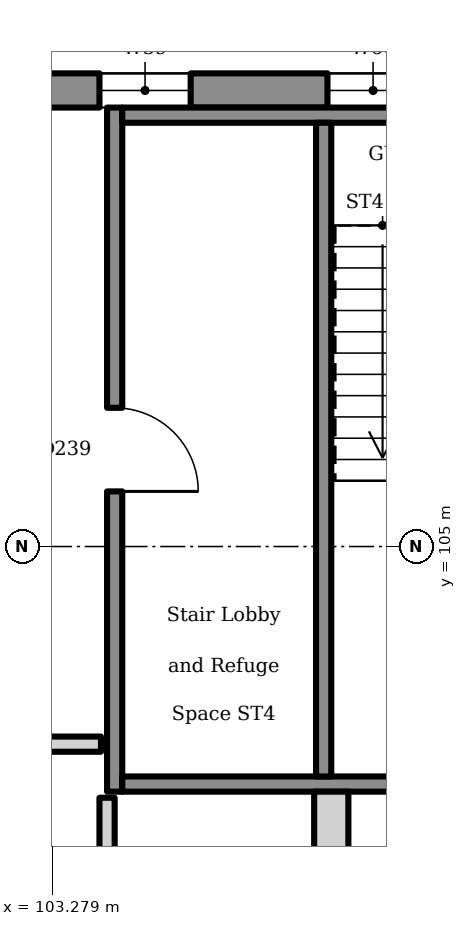
"""IFC4 building model, lengths in metres.
Left out: names, types, materials, properties, quantities, classifications, styles, units other than length and angle.
Written with IfcOpenShell. Run it as: python <this file> out.ifc"""

import sys

from ifc_helpers import new_model, si_unit, direction, frame, frame_2d, origin, place, context, subcontext, project, spatial, rectangle, extrude, element, fill, save


model = new_model("IFC4")
c1 = context("Model", 3, precision=1e-05, world=origin(), true_north=direction((0.0, 1.0)))
c2 = subcontext(c1, "Body", "Model", "MODEL_VIEW")
j1 = project(units=[si_unit("LENGTHUNIT", "METRE"), si_unit("PLANEANGLEUNIT", "RADIAN")], contexts=[c1])
p1 = place(None, origin())
s1 = spatial("IfcSite", under=j1, at=p1, CompositionType="ELEMENT")
p2 = place(p1, origin())
s2 = spatial("IfcBuilding", under=s1, at=p2, CompositionType="ELEMENT")
p3 = place(p2, frame((0.0, 0.0, 5.4)))
s3 = spatial("IfcBuildingStorey", under=s2, at=p3, CompositionType="ELEMENT", Elevation=5.4)
p4 = place(p3, frame((101.825, 111.0, 0.0), z_axis=(0.0, 0.0, 1.0), x_axis=(1.0, 0.0, 0.0)))
e1 = element("IfcWall", 1, at=p4, inside=s3, PredefinedType="SOLIDWALL", context=c2, shape_type="SweptSolid", body=[
    extrude(rectangle(XDim=8.35, YDim=0.45, at=frame_2d((4.175, 0.0))), origin(), (0.0, 0.0, 1.0), 3.8),
])
p5 = place(p4, frame((2.075, 0.0, 0.8)))
e2 = element("IfcOpeningElement", 2, at=p5, cuts=e1, PredefinedType="OPENING", context=c2, shape_type="SweptSolid", body=[
    extrude(rectangle(XDim=1.2, YDim=1.4, at=frame_2d((0.6, 0.7))), frame((0.0, 0.235, 0.0), z_axis=(0.0, -1.0, 0.0), x_axis=(1.0, 0.0, 0.0)), (0.0, 0.0, 1.0), 0.47),
])
p6 = place(p4, frame((5.075, 0.0, 0.8)))
e3 = element("IfcOpeningElement", 3, at=p6, cuts=e1, PredefinedType="OPENING", context=c2, shape_type="SweptSolid", body=[
    extrude(rectangle(XDim=1.2, YDim=1.4, at=frame_2d((0.6, 0.7))), frame((0.0, 0.235, 0.0), z_axis=(0.0, -1.0, 0.0), x_axis=(1.0, 0.0, 0.0)), (0.0, 0.0, 1.0), 0.47),
])
p7 = place(p3, frame((106.95, 99.891, 0.0), z_axis=(0.0, 0.0, 1.0), x_axis=(0.0, 1.0, 0.0)))
e4 = element("IfcWall", 4, at=p7, inside=s3, PredefinedType="SOLIDWALL", context=c2, shape_type="SweptSolid", body=[
    extrude(rectangle(XDim=1.884, YDim=0.45, at=frame_2d((0.942, 0.0))), origin(), (0.0, 0.0, 1.0), 4.3),
])
p8 = place(p3, frame((104.1, 101.775, 0.0), z_axis=(0.0, 0.0, 1.0), x_axis=(0.0, 1.0, 0.0)))
e5 = element("IfcWall", 5, at=p8, inside=s3, PredefinedType="SOLIDWALL", context=c2, shape_type="SweptSolid", body=[
    extrude(rectangle(XDim=9.0, YDim=0.2, at=frame_2d((4.5, 0.0))), origin(), (0.0, 0.0, 1.0), 4.3),
])
p9 = place(p8, frame((3.95, 0.0, 0.0)))
e6 = element("IfcOpeningElement", 6, at=p9, cuts=e5, PredefinedType="OPENING", context=c2, shape_type="SweptSolid", body=[
    extrude(rectangle(XDim=1.1, YDim=2.1, at=frame_2d((0.55, 1.05))), frame((0.0, 0.11, 0.0), z_axis=(0.0, -1.0, 0.0), x_axis=(1.0, 0.0, 0.0)), (0.0, 0.0, 1.0), 0.22),
])
for number, where, z_axis, x_axis in (
    (7, (104.2, 101.875, 0.0), (0.0, 0.0, 1.0), (1.0, 0.0, 0.0)),
    (8, (104.2, 110.675, 0.0), (0.0, 0.0, 1.0), (1.0, 0.0, 0.0)),
):
    element("IfcWall", number, at=place(p3, frame(where, z_axis=z_axis, x_axis=x_axis)), inside=s3, PredefinedType="SOLIDWALL", context=c2, shape_type="SweptSolid", body=[
        extrude(rectangle(XDim=5.6, YDim=0.2, at=frame_2d((2.8, 0.0))), origin(), (0.0, 0.0, 1.0), 4.3),
    ])
p10 = place(p3, frame((106.85, 101.975, 0.0), z_axis=(0.0, 0.0, 1.0), x_axis=(0.0, 1.0, 0.0)))
e9 = element("IfcWall", 9, at=p10, inside=s3, PredefinedType="SOLIDWALL", context=c2, shape_type="SweptSolid", body=[
    extrude(rectangle(XDim=8.6, YDim=0.2, at=frame_2d((4.3, 0.0))), origin(), (0.0, 0.0, 1.0), 4.3),
])
p11 = place(p3, frame((103.92, 102.4, 0.0), z_axis=(0.0, 0.0, 1.0), x_axis=(-1.0, 0.0, 0.0)))
e10 = element("IfcWall", 10, at=p11, inside=s3, PredefinedType="SOLIDWALL", context=c2, shape_type="SweptSolid", body=[
    extrude(rectangle(XDim=0.934, YDim=0.2, at=frame_2d((0.467, 0.0))), origin(), (0.0, 0.0, 1.0), 2.3),
])
p12 = place(p3, frame((104.0, 101.695, 0.0), z_axis=(0.0, 0.0, 1.0), x_axis=(0.0, -1.0, 0.0)))
e11 = element("IfcWall", 11, at=p12, inside=s3, PredefinedType="SOLIDWALL", context=c2, shape_type="SweptSolid", body=[
    extrude(rectangle(XDim=3.095, YDim=0.2, at=frame_2d((1.547, 0.0))), origin(), (0.0, 0.0, 1.0), 2.3),
])
p13 = place(p12, frame((1.048, 0.0, 0.0)))
e12 = element("IfcOpeningElement", 12, at=p13, cuts=e11, PredefinedType="OPENING", context=c2, shape_type="SweptSolid", body=[
    extrude(rectangle(XDim=1.0, YDim=2.1, at=frame_2d((0.5, 1.05))), frame((0.0, 0.11, 0.0), z_axis=(0.0, -1.0, 0.0), x_axis=(1.0, 0.0, 0.0)), (0.0, 0.0, 1.0), 0.22),
])
p14 = place(p5, origin())
e13 = element("IfcWindow", 13, at=p14, inside=s3, PartitioningType="SINGLE_PANEL", PredefinedType="WINDOW", context=c2, shape_type="SweptSolid", body=[
    extrude(rectangle(XDim=1.2, YDim=1.4, at=frame_2d((0.6, 0.7))), frame((0.0, 0.03, 0.0), z_axis=(0.0, -1.0, 0.0), x_axis=(1.0, 0.0, 0.0)), (0.0, 0.0, 1.0), 0.06),
])
fill(e2, e13)
p15 = place(p6, origin())
e14 = element("IfcWindow", 14, at=p15, inside=s3, PartitioningType="SINGLE_PANEL", PredefinedType="WINDOW", context=c2, shape_type="SweptSolid", body=[
    extrude(rectangle(XDim=1.2, YDim=1.4, at=frame_2d((0.6, 0.7))), frame((0.0, 0.03, 0.0), z_axis=(0.0, -1.0, 0.0), x_axis=(1.0, 0.0, 0.0)), (0.0, 0.0, 1.0), 0.06),
])
fill(e3, e14)
p16 = place(p9, frame((1.1, 0.0, 0.0), z_axis=(0.0, 0.0, 1.0), x_axis=(-1.0, 0.0, 0.0)))
e15 = element("IfcDoor", 15, at=p16, inside=s3, OperationType="SINGLE_SWING_LEFT", PredefinedType="DOOR", context=c2, shape_type="SweptSolid", body=[
    extrude(rectangle(XDim=1.1, YDim=2.1, at=frame_2d((0.55, 1.05))), frame((0.0, 0.025, 0.0), z_axis=(0.0, -1.0, 0.0), x_axis=(1.0, 0.0, 0.0)), (0.0, 0.0, 1.0), 0.05),
])
fill(e6, e15)
save(model, sys.argv[1])
